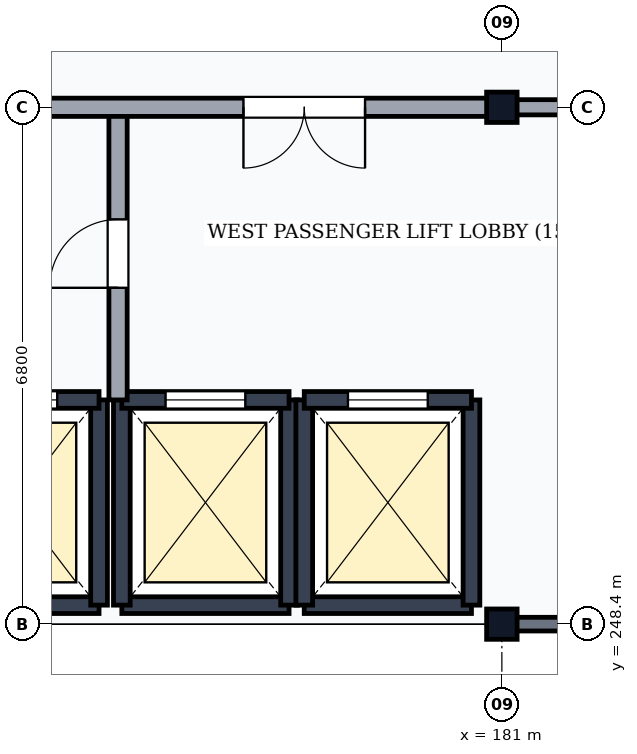
"""IFC4 building model, lengths in metres.
Left out: names, types, materials, properties, quantities, classifications, styles, units other than length and angle.
Written with IfcOpenShell. Run it as: python <this file> out.ifc"""

import sys

from ifc_helpers import new_model, si_unit, direction, frame, frame_2d, origin, origin_2d, place, context, subcontext, project, spatial, rectangle, i_section, extrude, element, fill, save


model = new_model("IFC4")
c1 = context("Model", 3, precision=1e-05, world=origin(), true_north=direction((0.0, 1.0)))
c2 = subcontext(c1, "Body", "Model", "MODEL_VIEW")
j1 = project(units=[si_unit("LENGTHUNIT", "METRE"), si_unit("PLANEANGLEUNIT", "RADIAN")], contexts=[c1])
p1 = place(None, origin())
s1 = spatial("IfcSite", under=j1, at=p1, CompositionType="ELEMENT")
p2 = place(p1, origin())
s2 = spatial("IfcBuilding", under=s1, at=p2, CompositionType="ELEMENT")
p3 = place(p2, frame((0.0, 0.0, 20.4)))
s3 = spatial("IfcBuildingStorey", under=s2, at=p3, CompositionType="ELEMENT", Elevation=20.4)
for number, where, z_axis, x_axis in (
    (1, (181.0, 248.4, 0.0), (0.0, 0.0, 1.0), (1.0, 0.0, 0.0)),
    (2, (181.0, 255.2, 0.0), (0.0, 0.0, 1.0), (1.0, 0.0, 0.0)),
):
    element("IfcColumn", number, at=place(p3, frame(where, z_axis=z_axis, x_axis=x_axis)), inside=s3, PredefinedType="COLUMN", context=c2, shape_type="SweptSolid", body=[
        extrude(i_section(OverallWidth=0.401, OverallDepth=0.399, WebThickness=0.025, FlangeThickness=0.04, FilletRadius=0.015, at=origin_2d()), origin(), (0.0, 0.0, 1.0), 3.9),
    ])
p4 = place(p3, frame((181.006, 248.4, 0.0), z_axis=(0.0, 0.0, 1.0), x_axis=(1.0, 0.0, 0.0)))
e3 = element("IfcWall", 3, at=p4, inside=s3, PredefinedType="SOLIDWALL", context=c2, shape_type="SweptSolid", body=[
    extrude(rectangle(XDim=7.988, YDim=0.18, at=frame_2d((3.994, 0.0))), origin(), (0.0, 0.0, 1.0), 3.348),
])
p5 = place(p4, frame((2.944, 0.0, 0.95)))
e4 = element("IfcOpeningElement", 4, at=p5, cuts=e3, PredefinedType="OPENING", context=c2, shape_type="SweptSolid", body=[
    extrude(rectangle(XDim=1.5, YDim=1.9, at=frame_2d((0.75, 0.95))), frame((0.0, 0.105, 0.0), z_axis=(0.0, -1.0, 0.0), x_axis=(1.0, 0.0, 0.0)), (0.0, 0.0, 1.0), 0.21),
])
p6 = place(p3, frame((173.5, 248.65, 0.0), z_axis=(0.0, 0.0, 1.0), x_axis=(1.0, 0.0, 0.0)))
e5 = element("IfcWall", 5, at=p6, inside=s3, PredefinedType="SHEAR", context=c2, shape_type="SweptSolid", body=[
    extrude(rectangle(XDim=2.2, YDim=0.22, at=frame_2d((1.1, 0.0))), origin(), (0.0, 0.0, 1.0), 3.66),
])
p7 = place(p3, frame((175.7, 248.65, 0.0), z_axis=(0.0, 0.0, 1.0), x_axis=(0.0, 1.0, 0.0)))
e6 = element("IfcWall", 6, at=p7, inside=s3, PredefinedType="SHEAR", context=c2, shape_type="SweptSolid", body=[
    extrude(rectangle(XDim=2.7, YDim=0.22, at=frame_2d((1.35, 0.0))), origin(), (0.0, 0.0, 1.0), 3.66),
])
p8 = place(p3, frame((173.5, 251.35, 0.0), z_axis=(0.0, 0.0, 1.0), x_axis=(1.0, 0.0, 0.0)))
e7 = element("IfcWall", 7, at=p8, inside=s3, PredefinedType="SHEAR", context=c2, shape_type="SweptSolid", body=[
    extrude(rectangle(XDim=2.2, YDim=0.22, at=frame_2d((1.1, 0.0))), origin(), (0.0, 0.0, 1.0), 3.66),
])
p9 = place(p8, frame((0.55, 0.0, 0.0)))
e8 = element("IfcOpeningElement", 8, at=p9, cuts=e7, PredefinedType="OPENING", context=c2, shape_type="SweptSolid", body=[
    extrude(rectangle(XDim=1.1, YDim=2.15, at=frame_2d((0.55, 1.075))), frame((0.0, 0.125, 0.0), z_axis=(0.0, -1.0, 0.0), x_axis=(1.0, 0.0, 0.0)), (0.0, 0.0, 1.0), 0.25),
])
p10 = place(p3, frame((176.0, 248.65, 0.0), z_axis=(0.0, 0.0, 1.0), x_axis=(1.0, 0.0, 0.0)))
e9 = element("IfcWall", 9, at=p10, inside=s3, PredefinedType="SHEAR", context=c2, shape_type="SweptSolid", body=[
    extrude(rectangle(XDim=2.2, YDim=0.22, at=frame_2d((1.1, 0.0))), origin(), (0.0, 0.0, 1.0), 3.66),
])
for number, where, z_axis, x_axis in (
    (10, (176.0, 248.65, 0.0), (0.0, 0.0, 1.0), (0.0, 1.0, 0.0)),
    (11, (178.2, 248.65, 0.0), (0.0, 0.0, 1.0), (0.0, 1.0, 0.0)),
):
    element("IfcWall", number, at=place(p3, frame(where, z_axis=z_axis, x_axis=x_axis)), inside=s3, PredefinedType="SHEAR", context=c2, shape_type="SweptSolid", body=[
        extrude(rectangle(XDim=2.7, YDim=0.22, at=frame_2d((1.35, 0.0))), origin(), (0.0, 0.0, 1.0), 3.66),
    ])
p11 = place(p3, frame((176.0, 251.35, 0.0), z_axis=(0.0, 0.0, 1.0), x_axis=(1.0, 0.0, 0.0)))
e12 = element("IfcWall", 12, at=p11, inside=s3, PredefinedType="SHEAR", context=c2, shape_type="SweptSolid", body=[
    extrude(rectangle(XDim=2.2, YDim=0.22, at=frame_2d((1.1, 0.0))), origin(), (0.0, 0.0, 1.0), 3.66),
])
p12 = place(p11, frame((0.575, 0.0, 0.0)))
e13 = element("IfcOpeningElement", 13, at=p12, cuts=e12, PredefinedType="OPENING", context=c2, shape_type="SweptSolid", body=[
    extrude(rectangle(XDim=1.05, YDim=2.15, at=frame_2d((0.525, 1.075))), frame((0.0, 0.125, 0.0), z_axis=(0.0, -1.0, 0.0), x_axis=(1.0, 0.0, 0.0)), (0.0, 0.0, 1.0), 0.25),
])
p13 = place(p3, frame((178.4, 248.65, 0.0), z_axis=(0.0, 0.0, 1.0), x_axis=(1.0, 0.0, 0.0)))
e14 = element("IfcWall", 14, at=p13, inside=s3, PredefinedType="SHEAR", context=c2, shape_type="SweptSolid", body=[
    extrude(rectangle(XDim=2.2, YDim=0.22, at=frame_2d((1.1, 0.0))), origin(), (0.0, 0.0, 1.0), 3.66),
])
for number, where, z_axis, x_axis in (
    (15, (178.4, 248.65, 0.0), (0.0, 0.0, 1.0), (0.0, 1.0, 0.0)),
    (16, (180.6, 248.65, 0.0), (0.0, 0.0, 1.0), (0.0, 1.0, 0.0)),
):
    element("IfcWall", number, at=place(p3, frame(where, z_axis=z_axis, x_axis=x_axis)), inside=s3, PredefinedType="SHEAR", context=c2, shape_type="SweptSolid", body=[
        extrude(rectangle(XDim=2.7, YDim=0.22, at=frame_2d((1.35, 0.0))), origin(), (0.0, 0.0, 1.0), 3.66),
    ])
p14 = place(p3, frame((178.4, 251.35, 0.0), z_axis=(0.0, 0.0, 1.0), x_axis=(1.0, 0.0, 0.0)))
e17 = element("IfcWall", 17, at=p14, inside=s3, PredefinedType="SHEAR", context=c2, shape_type="SweptSolid", body=[
    extrude(rectangle(XDim=2.2, YDim=0.22, at=frame_2d((1.1, 0.0))), origin(), (0.0, 0.0, 1.0), 3.66),
])
p15 = place(p14, frame((0.575, 0.0, 0.0)))
e18 = element("IfcOpeningElement", 18, at=p15, cuts=e17, PredefinedType="OPENING", context=c2, shape_type="SweptSolid", body=[
    extrude(rectangle(XDim=1.05, YDim=2.15, at=frame_2d((0.525, 1.075))), frame((0.0, 0.125, 0.0), z_axis=(0.0, -1.0, 0.0), x_axis=(1.0, 0.0, 0.0)), (0.0, 0.0, 1.0), 0.25),
])
p16 = place(p3, frame((175.95, 251.35, 0.0), z_axis=(0.0, 0.0, 1.0), x_axis=(0.0, 1.0, 0.0)))
e19 = element("IfcWall", 19, at=p16, inside=s3, PredefinedType="PARTITIONING", context=c2, shape_type="SweptSolid", body=[
    extrude(rectangle(XDim=3.85, YDim=0.24, at=frame_2d((1.925, 0.0))), origin(), (0.0, 0.0, 1.0), 3.66),
])
p17 = place(p16, frame((1.475, 0.0, 0.0)))
e20 = element("IfcOpeningElement", 20, at=p17, cuts=e19, PredefinedType="OPENING", context=c2, shape_type="SweptSolid", body=[
    extrude(rectangle(XDim=0.9, YDim=2.1, at=frame_2d((0.45, 1.05))), frame((0.0, 0.135, 0.0), z_axis=(0.0, -1.0, 0.0), x_axis=(1.0, 0.0, 0.0)), (0.0, 0.0, 1.0), 0.27),
])
p18 = place(p3, frame((173.0, 255.2, 0.0), z_axis=(0.0, 0.0, 1.0), x_axis=(1.0, 0.0, 0.0)))
e21 = element("IfcWall", 21, at=p18, inside=s3, PredefinedType="PARTITIONING", context=c2, shape_type="SweptSolid", body=[
    extrude(rectangle(XDim=8.0, YDim=0.24, at=frame_2d((4.0, 0.0))), origin(), (0.0, 0.0, 1.0), 3.058),
])
p19 = place(p18, frame((1.05, 0.0, 0.0)))
e22 = element("IfcOpeningElement", 22, at=p19, cuts=e21, PredefinedType="OPENING", context=c2, shape_type="SweptSolid", body=[
    extrude(rectangle(XDim=1.0, YDim=2.1, at=frame_2d((0.5, 1.05))), frame((0.0, 0.135, 0.0), z_axis=(0.0, -1.0, 0.0), x_axis=(1.0, 0.0, 0.0)), (0.0, 0.0, 1.0), 0.27),
])
p20 = place(p18, frame((4.6, 0.0, 0.0)))
e23 = element("IfcOpeningElement", 23, at=p20, cuts=e21, PredefinedType="OPENING", context=c2, shape_type="SweptSolid", body=[
    extrude(rectangle(XDim=1.6, YDim=2.25, at=frame_2d((0.8, 1.125))), frame((0.0, 0.135, 0.0), z_axis=(0.0, -1.0, 0.0), x_axis=(1.0, 0.0, 0.0)), (0.0, 0.0, 1.0), 0.27),
])
p21 = place(p3, frame((181.0, 255.2, 0.0), z_axis=(0.0, 0.0, 1.0), x_axis=(1.0, 0.0, 0.0)))
e24 = element("IfcWall", 24, at=p21, inside=s3, PredefinedType="PARTITIONING", context=c2, shape_type="SweptSolid", body=[
    extrude(rectangle(XDim=8.0, YDim=0.2, at=frame_2d((4.0, 0.0))), origin(), (0.0, 0.0, 1.0), 3.058),
])
p22 = place(p21, frame((0.85, 0.0, 0.0)))
e25 = element("IfcOpeningElement", 25, at=p22, cuts=e24, PredefinedType="OPENING", context=c2, shape_type="SweptSolid", body=[
    extrude(rectangle(XDim=0.9, YDim=2.1, at=frame_2d((0.45, 1.05))), frame((0.0, 0.115, 0.0), z_axis=(0.0, -1.0, 0.0), x_axis=(1.0, 0.0, 0.0)), (0.0, 0.0, 1.0), 0.23),
])
p23 = place(p21, frame((3.25, 0.0, 0.0)))
e26 = element("IfcOpeningElement", 26, at=p23, cuts=e24, PredefinedType="OPENING", context=c2, shape_type="SweptSolid", body=[
    extrude(rectangle(XDim=0.9, YDim=2.1, at=frame_2d((0.45, 1.05))), frame((0.0, 0.115, 0.0), z_axis=(0.0, -1.0, 0.0), x_axis=(1.0, 0.0, 0.0)), (0.0, 0.0, 1.0), 0.23),
])
p24 = place(p21, frame((5.075, 0.0, 0.0)))
e27 = element("IfcOpeningElement", 27, at=p24, cuts=e24, PredefinedType="OPENING", context=c2, shape_type="SweptSolid", body=[
    extrude(rectangle(XDim=0.95, YDim=2.1, at=frame_2d((0.475, 1.05))), frame((0.0, 0.115, 0.0), z_axis=(0.0, -1.0, 0.0), x_axis=(1.0, 0.0, 0.0)), (0.0, 0.0, 1.0), 0.23),
])
p25 = place(p21, frame((6.5, 0.0, 0.0)))
e28 = element("IfcOpeningElement", 28, at=p25, cuts=e24, PredefinedType="OPENING", context=c2, shape_type="SweptSolid", body=[
    extrude(rectangle(XDim=0.85, YDim=2.1, at=frame_2d((0.425, 1.05))), frame((0.0, 0.115, 0.0), z_axis=(0.0, -1.0, 0.0), x_axis=(1.0, 0.0, 0.0)), (0.0, 0.0, 1.0), 0.23),
])
p26 = place(p9, origin())
e29 = element("IfcDoor", 29, at=p26, inside=s3, OperationType="DOUBLE_DOOR_SLIDING", PredefinedType="USERDEFINED", context=c2, shape_type="SweptSolid", body=[
    extrude(rectangle(XDim=1.1, YDim=2.15, at=frame_2d((0.55, 1.075))), frame((0.0, 0.025, 0.0), z_axis=(0.0, -1.0, 0.0), x_axis=(1.0, 0.0, 0.0)), (0.0, 0.0, 1.0), 0.05),
])
fill(e8, e29)
p27 = place(p12, origin())
e30 = element("IfcDoor", 30, at=p27, inside=s3, OperationType="DOUBLE_DOOR_SLIDING", PredefinedType="USERDEFINED", context=c2, shape_type="SweptSolid", body=[
    extrude(rectangle(XDim=1.05, YDim=2.15, at=frame_2d((0.525, 1.075))), frame((0.0, 0.025, 0.0), z_axis=(0.0, -1.0, 0.0), x_axis=(1.0, 0.0, 0.0)), (0.0, 0.0, 1.0), 0.05),
])
fill(e13, e30)
p28 = place(p15, origin())
e31 = element("IfcDoor", 31, at=p28, inside=s3, OperationType="DOUBLE_DOOR_SLIDING", PredefinedType="USERDEFINED", context=c2, shape_type="SweptSolid", body=[
    extrude(rectangle(XDim=1.05, YDim=2.15, at=frame_2d((0.525, 1.075))), frame((0.0, 0.025, 0.0), z_axis=(0.0, -1.0, 0.0), x_axis=(1.0, 0.0, 0.0)), (0.0, 0.0, 1.0), 0.05),
])
fill(e18, e31)
p29 = place(p17, origin())
e32 = element("IfcDoor", 32, at=p29, inside=s3, OperationType="SINGLE_SWING_LEFT", PredefinedType="DOOR", context=c2, shape_type="SweptSolid", body=[
    extrude(rectangle(XDim=0.9, YDim=2.1, at=frame_2d((0.45, 1.05))), frame((0.0, 0.025, 0.0), z_axis=(0.0, -1.0, 0.0), x_axis=(1.0, 0.0, 0.0)), (0.0, 0.0, 1.0), 0.05),
])
fill(e20, e32)
p30 = place(p20, frame((1.6, 0.0, 0.0), z_axis=(0.0, 0.0, 1.0), x_axis=(-1.0, 0.0, 0.0)))
e33 = element("IfcDoor", 33, at=p30, inside=s3, OperationType="DOUBLE_DOOR_SINGLE_SWING", PredefinedType="DOOR", context=c2, shape_type="SweptSolid", body=[
    extrude(rectangle(XDim=1.6, YDim=2.25, at=frame_2d((0.8, 1.125))), frame((0.0, 0.025, 0.0), z_axis=(0.0, -1.0, 0.0), x_axis=(1.0, 0.0, 0.0)), (0.0, 0.0, 1.0), 0.05),
])
fill(e23, e33)
save(model, sys.argv[1])
